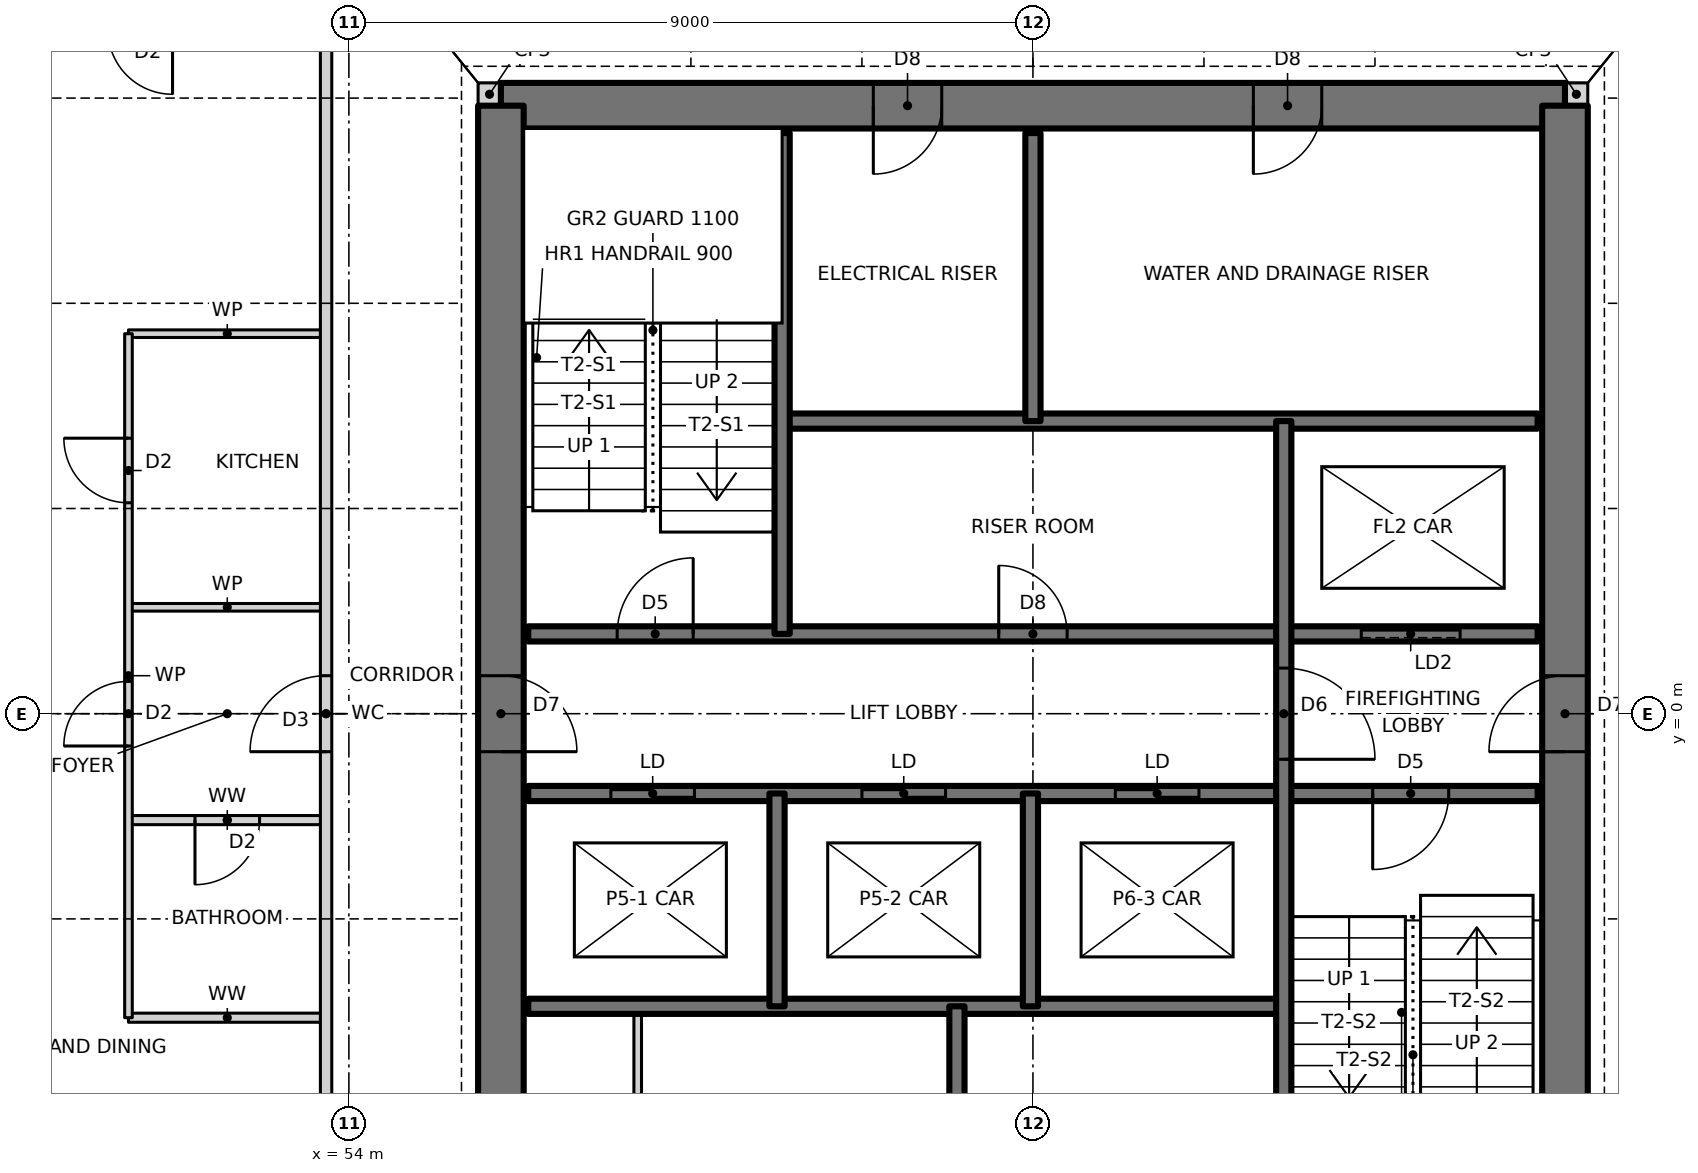
"""IFC4 building model, lengths in metres.
Left out: names, types, materials, properties, quantities, classifications, styles, units other than length and angle.
Written with IfcOpenShell. Run it as: python <this file> out.ifc"""

import sys

from ifc_helpers import new_model, si_unit, direction, frame, frame_2d, origin, place, context, subcontext, project, spatial, rectangle, extrude, element, fill, save


model = new_model("IFC4")
c1 = context("Model", 3, precision=1e-05, world=origin(), true_north=direction((0.0, 1.0)))
c2 = subcontext(c1, "Body", "Model", "MODEL_VIEW")
j1 = project(units=[si_unit("LENGTHUNIT", "METRE"), si_unit("PLANEANGLEUNIT", "RADIAN")], contexts=[c1])
p1 = place(None, origin())
s1 = spatial("IfcSite", under=j1, at=p1, CompositionType="ELEMENT")
p2 = place(p1, origin())
s2 = spatial("IfcBuilding", under=s1, at=p2, CompositionType="ELEMENT")
p3 = place(p2, frame((0.0, 0.0, 94.5)))
s3 = spatial("IfcBuildingStorey", under=s2, at=p3, CompositionType="ELEMENT", Elevation=94.5)
for number, where, z_axis, x_axis in (
    (1, (70.0, 8.15, 0.0), (0.0, 0.0, 1.0), (1.0, 0.0, 0.0)),
    (2, (55.7, 8.15, 0.0), (0.0, 0.0, 1.0), (1.0, 0.0, 0.0)),
):
    element("IfcWall", number, at=place(p3, frame(where, z_axis=z_axis, x_axis=x_axis)), inside=s3, PredefinedType="SOLIDWALL", context=c2, shape_type="SweptSolid", body=[
        extrude(rectangle(XDim=0.3, YDim=0.3, at=frame_2d((0.15, 0.0))), origin(), (0.0, 0.0, 1.0), 3.5),
    ])
p4 = place(p3, frame((70.0, 8.0, 0.0), z_axis=(0.0, 0.0, 1.0), x_axis=(-1.0, 0.0, 0.0)))
e3 = element("IfcWall", 3, at=p4, inside=s3, PredefinedType="SHEAR", context=c2, shape_type="SweptSolid", body=[
    extrude(rectangle(XDim=14.0, YDim=0.6, at=frame_2d((7.0, 0.0))), origin(), (0.0, 0.0, 1.0), 3.5),
])
p5 = place(p4, frame((8.2, 0.0, 0.0)))
e4 = element("IfcOpeningElement", 4, at=p5, cuts=e3, PredefinedType="OPENING", context=c2, shape_type="SweptSolid", body=[
    extrude(rectangle(XDim=0.9, YDim=2.1, at=frame_2d((0.45, 1.05))), frame((0.0, 0.31, 0.0), z_axis=(0.0, -1.0, 0.0), x_axis=(1.0, 0.0, 0.0)), (0.0, 0.0, 1.0), 0.62),
])
p6 = place(p4, frame((3.2, 0.0, 0.0)))
e5 = element("IfcOpeningElement", 5, at=p6, cuts=e3, PredefinedType="OPENING", context=c2, shape_type="SweptSolid", body=[
    extrude(rectangle(XDim=0.9, YDim=2.1, at=frame_2d((0.45, 1.05))), frame((0.0, 0.31, 0.0), z_axis=(0.0, -1.0, 0.0), x_axis=(1.0, 0.0, 0.0)), (0.0, 0.0, 1.0), 0.62),
])
p7 = place(p3, frame((70.0, -8.0, 0.0), z_axis=(0.0, 0.0, 1.0), x_axis=(0.0, 1.0, 0.0)))
e6 = element("IfcWall", 6, at=p7, inside=s3, PredefinedType="SHEAR", context=c2, shape_type="SweptSolid", body=[
    extrude(rectangle(XDim=16.0, YDim=0.6, at=frame_2d((8.0, 0.0))), origin(), (0.0, 0.0, 1.0), 3.5),
])
p8 = place(p7, frame((7.5, 0.0, 0.0)))
e7 = element("IfcOpeningElement", 7, at=p8, cuts=e6, PredefinedType="OPENING", context=c2, shape_type="SweptSolid", body=[
    extrude(rectangle(XDim=1.0, YDim=2.1, at=frame_2d((0.5, 1.05))), frame((0.0, 0.31, 0.0), z_axis=(0.0, -1.0, 0.0), x_axis=(1.0, 0.0, 0.0)), (0.0, 0.0, 1.0), 0.62),
])
p9 = place(p3, frame((56.0, 8.0, 0.0), z_axis=(0.0, 0.0, 1.0), x_axis=(0.0, -1.0, 0.0)))
e8 = element("IfcWall", 8, at=p9, inside=s3, PredefinedType="SHEAR", context=c2, shape_type="SweptSolid", body=[
    extrude(rectangle(XDim=16.0, YDim=0.6, at=frame_2d((8.0, 0.0))), origin(), (0.0, 0.0, 1.0), 3.5),
])
p10 = place(p9, frame((7.5, 0.0, 0.0)))
e9 = element("IfcOpeningElement", 9, at=p10, cuts=e8, PredefinedType="OPENING", context=c2, shape_type="SweptSolid", body=[
    extrude(rectangle(XDim=1.0, YDim=2.1, at=frame_2d((0.5, 1.05))), frame((0.0, 0.31, 0.0), z_axis=(0.0, -1.0, 0.0), x_axis=(1.0, 0.0, 0.0)), (0.0, 0.0, 1.0), 0.62),
])
p11 = place(p3, frame((51.1, -4.0, 0.0), z_axis=(0.0, 0.0, 1.0), x_axis=(1.0, 0.0, 0.0)))
e10 = element("IfcWall", 10, at=p11, inside=s3, PredefinedType="PARTITIONING", context=c2, shape_type="SweptSolid", body=[
    extrude(rectangle(XDim=2.6, YDim=0.12, at=frame_2d((1.3, 0.0))), origin(), (0.0, 0.0, 1.0), 3.27),
])
p12 = place(p3, frame((56.36, -3.85, 0.0), z_axis=(0.0, 0.0, 1.0), x_axis=(1.0, 0.0, 0.0)))
e11 = element("IfcWall", 11, at=p12, inside=s3, PredefinedType="SOLIDWALL", context=c2, shape_type="SweptSolid", body=[
    extrude(rectangle(XDim=9.94, YDim=0.2, at=frame_2d((4.97, 0.0))), origin(), (0.0, 0.0, 1.0), 3.5),
])
p13 = place(p3, frame((51.1, -1.4, 0.0), z_axis=(0.0, 0.0, 1.0), x_axis=(1.0, 0.0, 0.0)))
e12 = element("IfcWall", 12, at=p13, inside=s3, PredefinedType="PARTITIONING", context=c2, shape_type="SweptSolid", body=[
    extrude(rectangle(XDim=2.6, YDim=0.12, at=frame_2d((1.3, 0.0))), origin(), (0.0, 0.0, 1.0), 3.27),
])
p14 = place(p13, frame((0.875, 0.0, 0.0)))
e13 = element("IfcOpeningElement", 13, at=p14, cuts=e12, PredefinedType="OPENING", context=c2, shape_type="SweptSolid", body=[
    extrude(rectangle(XDim=0.85, YDim=2.1, at=frame_2d((0.425, 1.05))), frame((0.0, 0.07, 0.0), z_axis=(0.0, -1.0, 0.0), x_axis=(1.0, 0.0, 0.0)), (0.0, 0.0, 1.0), 0.14),
])
p15 = place(p3, frame((56.36, -1.05, 0.0), z_axis=(0.0, 0.0, 1.0), x_axis=(1.0, 0.0, 0.0)))
e14 = element("IfcWall", 14, at=p15, inside=s3, PredefinedType="SOLIDWALL", context=c2, shape_type="SweptSolid", body=[
    extrude(rectangle(XDim=13.28, YDim=0.2, at=frame_2d((6.64, 0.0))), origin(), (0.0, 0.0, 1.0), 3.5),
])
p16 = place(p15, frame((11.11, 0.0, 0.0)))
e15 = element("IfcOpeningElement", 15, at=p16, cuts=e14, PredefinedType="OPENING", context=c2, shape_type="SweptSolid", body=[
    extrude(rectangle(XDim=1.0, YDim=2.1, at=frame_2d((0.5, 1.05))), frame((0.0, 0.11, 0.0), z_axis=(0.0, -1.0, 0.0), x_axis=(1.0, 0.0, 0.0)), (0.0, 0.0, 1.0), 0.22),
])
p17 = place(p15, frame((1.087, 0.0, 0.0)))
e16 = element("IfcOpeningElement", 16, at=p17, cuts=e14, PredefinedType="OPENING", context=c2, shape_type="SweptSolid", body=[
    extrude(rectangle(XDim=1.1, YDim=2.1, at=frame_2d((0.55, 1.05))), frame((0.0, 0.11, 0.0), z_axis=(0.0, -1.0, 0.0), x_axis=(1.0, 0.0, 0.0)), (0.0, 0.0, 1.0), 0.22),
])
p18 = place(p15, frame((4.39, 0.0, 0.0)))
e17 = element("IfcOpeningElement", 17, at=p18, cuts=e14, PredefinedType="OPENING", context=c2, shape_type="SweptSolid", body=[
    extrude(rectangle(XDim=1.1, YDim=2.1, at=frame_2d((0.55, 1.05))), frame((0.0, 0.11, 0.0), z_axis=(0.0, -1.0, 0.0), x_axis=(1.0, 0.0, 0.0)), (0.0, 0.0, 1.0), 0.22),
])
p19 = place(p15, frame((7.724, 0.0, 0.0)))
e18 = element("IfcOpeningElement", 18, at=p19, cuts=e14, PredefinedType="OPENING", context=c2, shape_type="SweptSolid", body=[
    extrude(rectangle(XDim=1.1, YDim=2.1, at=frame_2d((0.55, 1.05))), frame((0.0, 0.11, 0.0), z_axis=(0.0, -1.0, 0.0), x_axis=(1.0, 0.0, 0.0)), (0.0, 0.0, 1.0), 0.22),
])
p20 = place(p3, frame((56.36, 1.05, 0.0), z_axis=(0.0, 0.0, 1.0), x_axis=(1.0, 0.0, 0.0)))
e19 = element("IfcWall", 19, at=p20, inside=s3, PredefinedType="SOLIDWALL", context=c2, shape_type="SweptSolid", body=[
    extrude(rectangle(XDim=13.28, YDim=0.2, at=frame_2d((6.64, 0.0))), origin(), (0.0, 0.0, 1.0), 3.5),
])
p21 = place(p20, frame((1.17, 0.0, 0.0)))
e20 = element("IfcOpeningElement", 20, at=p21, cuts=e19, PredefinedType="OPENING", context=c2, shape_type="SweptSolid", body=[
    extrude(rectangle(XDim=1.0, YDim=2.1, at=frame_2d((0.5, 1.05))), frame((0.0, 0.11, 0.0), z_axis=(0.0, -1.0, 0.0), x_axis=(1.0, 0.0, 0.0)), (0.0, 0.0, 1.0), 0.22),
])
p22 = place(p20, frame((6.19, 0.0, 0.0)))
e21 = element("IfcOpeningElement", 21, at=p22, cuts=e19, PredefinedType="OPENING", context=c2, shape_type="SweptSolid", body=[
    extrude(rectangle(XDim=0.9, YDim=2.1, at=frame_2d((0.45, 1.05))), frame((0.0, 0.11, 0.0), z_axis=(0.0, -1.0, 0.0), x_axis=(1.0, 0.0, 0.0)), (0.0, 0.0, 1.0), 0.22),
])
p23 = place(p20, frame((10.96, 0.0, 0.0)))
e22 = element("IfcOpeningElement", 22, at=p23, cuts=e19, PredefinedType="OPENING", context=c2, shape_type="SweptSolid", body=[
    extrude(rectangle(XDim=1.3, YDim=2.1, at=frame_2d((0.65, 1.05))), frame((0.0, 0.11, 0.0), z_axis=(0.0, -1.0, 0.0), x_axis=(1.0, 0.0, 0.0)), (0.0, 0.0, 1.0), 0.22),
])
p24 = place(p3, frame((51.1, 1.4, 0.0), z_axis=(0.0, 0.0, 1.0), x_axis=(1.0, 0.0, 0.0)))
e23 = element("IfcWall", 23, at=p24, inside=s3, PredefinedType="PARTITIONING", context=c2, shape_type="SweptSolid", body=[
    extrude(rectangle(XDim=2.6, YDim=0.1, at=frame_2d((1.3, 0.0))), origin(), (0.0, 0.0, 1.0), 3.27),
])
p25 = place(p3, frame((59.7, 3.85, 0.0), z_axis=(0.0, 0.0, 1.0), x_axis=(1.0, 0.0, 0.0)))
e24 = element("IfcWall", 24, at=p25, inside=s3, PredefinedType="SOLIDWALL", context=c2, shape_type="SweptSolid", body=[
    extrude(rectangle(XDim=9.94, YDim=0.2, at=frame_2d((4.97, 0.0))), origin(), (0.0, 0.0, 1.0), 3.5),
])
p26 = place(p3, frame((51.1, 5.0, 0.0), z_axis=(0.0, 0.0, 1.0), x_axis=(1.0, 0.0, 0.0)))
e25 = element("IfcWall", 25, at=p26, inside=s3, PredefinedType="PARTITIONING", context=c2, shape_type="SweptSolid", body=[
    extrude(rectangle(XDim=2.6, YDim=0.1, at=frame_2d((1.3, 0.0))), origin(), (0.0, 0.0, 1.0), 3.27),
])
p27 = place(p3, frame((66.3, -7.64, 0.0), z_axis=(0.0, 0.0, 1.0), x_axis=(0.0, 1.0, 0.0)))
e26 = element("IfcWall", 26, at=p27, inside=s3, PredefinedType="SOLIDWALL", context=c2, shape_type="SweptSolid", body=[
    extrude(rectangle(XDim=11.49, YDim=0.2, at=frame_2d((5.745, 0.0))), origin(), (0.0, 0.0, 1.0), 3.5),
])
p28 = place(p27, frame((7.04, 0.0, 0.0)))
e27 = element("IfcOpeningElement", 27, at=p28, cuts=e26, PredefinedType="OPENING", context=c2, shape_type="SweptSolid", body=[
    extrude(rectangle(XDim=1.2, YDim=2.1, at=frame_2d((0.6, 1.05))), frame((0.0, 0.11, 0.0), z_axis=(0.0, -1.0, 0.0), x_axis=(1.0, 0.0, 0.0)), (0.0, 0.0, 1.0), 0.22),
])
p29 = place(p3, frame((63.0, 3.85, 0.0), z_axis=(0.0, 0.0, 1.0), x_axis=(0.0, 1.0, 0.0)))
e28 = element("IfcWall", 28, at=p29, inside=s3, PredefinedType="SOLIDWALL", context=c2, shape_type="SweptSolid", body=[
    extrude(rectangle(XDim=3.79, YDim=0.2, at=frame_2d((1.895, 0.0))), origin(), (0.0, 0.0, 1.0), 3.5),
])
p30 = place(p3, frame((62.967, -3.85, 0.0), z_axis=(0.0, 0.0, 1.0), x_axis=(0.0, 1.0, 0.0)))
e29 = element("IfcWall", 29, at=p30, inside=s3, PredefinedType="SOLIDWALL", context=c2, shape_type="SweptSolid", body=[
    extrude(rectangle(XDim=2.8, YDim=0.2, at=frame_2d((1.4, 0.0))), origin(), (0.0, 0.0, 1.0), 3.5),
])
p31 = place(p3, frame((62.0, -7.64, 0.0), z_axis=(0.0, 0.0, 1.0), x_axis=(0.0, 1.0, 0.0)))
e30 = element("IfcWall", 30, at=p31, inside=s3, PredefinedType="SOLIDWALL", context=c2, shape_type="SweptSolid", body=[
    extrude(rectangle(XDim=3.79, YDim=0.2, at=frame_2d((1.895, 0.0))), origin(), (0.0, 0.0, 1.0), 3.5),
])
p32 = place(p3, frame((59.7, 1.05, 0.0), z_axis=(0.0, 0.0, 1.0), x_axis=(0.0, 1.0, 0.0)))
e31 = element("IfcWall", 31, at=p32, inside=s3, PredefinedType="SOLIDWALL", context=c2, shape_type="SweptSolid", body=[
    extrude(rectangle(XDim=6.59, YDim=0.2, at=frame_2d((3.295, 0.0))), origin(), (0.0, 0.0, 1.0), 3.5),
])
p33 = place(p3, frame((59.633, -3.85, 0.0), z_axis=(0.0, 0.0, 1.0), x_axis=(0.0, 1.0, 0.0)))
e32 = element("IfcWall", 32, at=p33, inside=s3, PredefinedType="SOLIDWALL", context=c2, shape_type="SweptSolid", body=[
    extrude(rectangle(XDim=2.8, YDim=0.2, at=frame_2d((1.4, 0.0))), origin(), (0.0, 0.0, 1.0), 3.5),
])
p34 = place(p3, frame((57.8, -7.64, 0.0), z_axis=(0.0, 0.0, 1.0), x_axis=(0.0, 1.0, 0.0)))
e33 = element("IfcWall", 33, at=p34, inside=s3, PredefinedType="PARTITIONING", context=c2, shape_type="SweptSolid", body=[
    extrude(rectangle(XDim=3.79, YDim=0.1, at=frame_2d((1.895, 0.0))), origin(), (0.0, 0.0, 1.0), 3.3),
])
p35 = place(p34, frame((1.445, 0.0, 0.0)))
e34 = element("IfcOpeningElement", 34, at=p35, cuts=e33, PredefinedType="OPENING", context=c2, shape_type="SweptSolid", body=[
    extrude(rectangle(XDim=0.9, YDim=2.1, at=frame_2d((0.45, 1.05))), frame((0.0, 0.06, 0.0), z_axis=(0.0, -1.0, 0.0), x_axis=(1.0, 0.0, 0.0)), (0.0, 0.0, 1.0), 0.12),
])
p36 = place(p3, frame((53.7, -10.768, 0.0), z_axis=(0.0, 0.0, 1.0), x_axis=(0.0, 1.0, 0.0)))
e35 = element("IfcWall", 35, at=p36, inside=s3, PredefinedType="PARTITIONING", context=c2, shape_type="SweptSolid", body=[
    extrude(rectangle(XDim=21.536, YDim=0.15, at=frame_2d((10.768, 0.0))), origin(), (0.0, 0.0, 1.0), 3.27),
])
p37 = place(p36, frame((10.268, 0.0, 0.0)))
e36 = element("IfcOpeningElement", 36, at=p37, cuts=e35, PredefinedType="OPENING", context=c2, shape_type="SweptSolid", body=[
    extrude(rectangle(XDim=1.0, YDim=2.1, at=frame_2d((0.5, 1.05))), frame((0.0, 0.085, 0.0), z_axis=(0.0, -1.0, 0.0), x_axis=(1.0, 0.0, 0.0)), (0.0, 0.0, 1.0), 0.17),
])
p38 = place(p3, frame((51.1, -4.0, 0.0), z_axis=(0.0, 0.0, 1.0), x_axis=(0.0, 1.0, 0.0)))
e37 = element("IfcWall", 37, at=p38, inside=s3, PredefinedType="PARTITIONING", context=c2, shape_type="SweptSolid", body=[
    extrude(rectangle(XDim=9.0, YDim=0.1, at=frame_2d((4.5, 0.0))), origin(), (0.0, 0.0, 1.0), 3.27),
])
p39 = place(p38, frame((6.775, 0.0, 0.0)))
e38 = element("IfcOpeningElement", 38, at=p39, cuts=e37, PredefinedType="OPENING", context=c2, shape_type="SweptSolid", body=[
    extrude(rectangle(XDim=0.85, YDim=2.1, at=frame_2d((0.425, 1.05))), frame((0.0, 0.06, 0.0), z_axis=(0.0, -1.0, 0.0), x_axis=(1.0, 0.0, 0.0)), (0.0, 0.0, 1.0), 0.12),
])
p40 = place(p38, frame((3.575, 0.0, 0.0)))
e39 = element("IfcOpeningElement", 39, at=p40, cuts=e37, PredefinedType="OPENING", context=c2, shape_type="SweptSolid", body=[
    extrude(rectangle(XDim=0.85, YDim=2.1, at=frame_2d((0.425, 1.05))), frame((0.0, 0.06, 0.0), z_axis=(0.0, -1.0, 0.0), x_axis=(1.0, 0.0, 0.0)), (0.0, 0.0, 1.0), 0.12),
])
p41 = place(p21, origin())
e40 = element("IfcDoor", 40, at=p41, inside=s3, OperationType="SINGLE_SWING_RIGHT", PredefinedType="DOOR", context=c2, shape_type="SweptSolid", body=[
    extrude(rectangle(XDim=1.0, YDim=2.1, at=frame_2d((0.5, 1.05))), frame((0.0, 0.025, 0.0), z_axis=(0.0, -1.0, 0.0), x_axis=(1.0, 0.0, 0.0)), (0.0, 0.0, 1.0), 0.05),
])
fill(e20, e40)
p42 = place(p16, frame((1.0, 0.0, 0.0), z_axis=(0.0, 0.0, 1.0), x_axis=(-1.0, 0.0, 0.0)))
e41 = element("IfcDoor", 41, at=p42, inside=s3, OperationType="SINGLE_SWING_RIGHT", PredefinedType="DOOR", context=c2, shape_type="SweptSolid", body=[
    extrude(rectangle(XDim=1.0, YDim=2.1, at=frame_2d((0.5, 1.05))), frame((0.0, 0.025, 0.0), z_axis=(0.0, -1.0, 0.0), x_axis=(1.0, 0.0, 0.0)), (0.0, 0.0, 1.0), 0.05),
])
fill(e15, e41)
p43 = place(p28, frame((1.2, 0.0, 0.0), z_axis=(0.0, 0.0, 1.0), x_axis=(-1.0, 0.0, 0.0)))
e42 = element("IfcDoor", 42, at=p43, inside=s3, OperationType="SINGLE_SWING_RIGHT", PredefinedType="DOOR", context=c2, shape_type="SweptSolid", body=[
    extrude(rectangle(XDim=1.2, YDim=2.1, at=frame_2d((0.6, 1.05))), frame((0.0, 0.025, 0.0), z_axis=(0.0, -1.0, 0.0), x_axis=(1.0, 0.0, 0.0)), (0.0, 0.0, 1.0), 0.05),
])
fill(e27, e42)
p44 = place(p22, origin())
e43 = element("IfcDoor", 43, at=p44, inside=s3, OperationType="SINGLE_SWING_LEFT", PredefinedType="DOOR", context=c2, shape_type="SweptSolid", body=[
    extrude(rectangle(XDim=0.9, YDim=2.1, at=frame_2d((0.45, 1.05))), frame((0.0, 0.025, 0.0), z_axis=(0.0, -1.0, 0.0), x_axis=(1.0, 0.0, 0.0)), (0.0, 0.0, 1.0), 0.05),
])
fill(e21, e43)
p45 = place(p39, origin())
e44 = element("IfcDoor", 44, at=p45, inside=s3, OperationType="SINGLE_SWING_RIGHT", PredefinedType="DOOR", context=c2, shape_type="SweptSolid", body=[
    extrude(rectangle(XDim=0.85, YDim=2.1, at=frame_2d((0.425, 1.05))), frame((0.0, 0.025, 0.0), z_axis=(0.0, -1.0, 0.0), x_axis=(1.0, 0.0, 0.0)), (0.0, 0.0, 1.0), 0.05),
])
fill(e38, e44)
p46 = place(p37, origin())
e45 = element("IfcDoor", 45, at=p46, inside=s3, OperationType="SINGLE_SWING_LEFT", PredefinedType="DOOR", context=c2, shape_type="SweptSolid", body=[
    extrude(rectangle(XDim=1.0, YDim=2.1, at=frame_2d((0.5, 1.05))), frame((0.0, 0.025, 0.0), z_axis=(0.0, -1.0, 0.0), x_axis=(1.0, 0.0, 0.0)), (0.0, 0.0, 1.0), 0.05),
])
fill(e36, e45)
p47 = place(p40, origin())
e46 = element("IfcDoor", 46, at=p47, inside=s3, OperationType="SINGLE_SWING_LEFT", PredefinedType="DOOR", context=c2, shape_type="SweptSolid", body=[
    extrude(rectangle(XDim=0.85, YDim=2.1, at=frame_2d((0.425, 1.05))), frame((0.0, 0.025, 0.0), z_axis=(0.0, -1.0, 0.0), x_axis=(1.0, 0.0, 0.0)), (0.0, 0.0, 1.0), 0.05),
])
fill(e39, e46)
p48 = place(p14, frame((0.85, 0.0, 0.0), z_axis=(0.0, 0.0, 1.0), x_axis=(-1.0, 0.0, 0.0)))
e47 = element("IfcDoor", 47, at=p48, inside=s3, OperationType="SINGLE_SWING_RIGHT", PredefinedType="DOOR", context=c2, shape_type="SweptSolid", body=[
    extrude(rectangle(XDim=0.85, YDim=2.1, at=frame_2d((0.425, 1.05))), frame((0.0, 0.025, 0.0), z_axis=(0.0, -1.0, 0.0), x_axis=(1.0, 0.0, 0.0)), (0.0, 0.0, 1.0), 0.05),
])
fill(e13, e47)
p49 = place(p10, origin())
e48 = element("IfcDoor", 48, at=p49, inside=s3, OperationType="SINGLE_SWING_RIGHT", PredefinedType="DOOR", context=c2, shape_type="SweptSolid", body=[
    extrude(rectangle(XDim=1.0, YDim=2.1, at=frame_2d((0.5, 1.05))), frame((0.0, 0.025, 0.0), z_axis=(0.0, -1.0, 0.0), x_axis=(1.0, 0.0, 0.0)), (0.0, 0.0, 1.0), 0.05),
])
fill(e9, e48)
p50 = place(p8, origin())
e49 = element("IfcDoor", 49, at=p50, inside=s3, OperationType="SINGLE_SWING_LEFT", PredefinedType="DOOR", context=c2, shape_type="SweptSolid", body=[
    extrude(rectangle(XDim=1.0, YDim=2.1, at=frame_2d((0.5, 1.05))), frame((0.0, 0.025, 0.0), z_axis=(0.0, -1.0, 0.0), x_axis=(1.0, 0.0, 0.0)), (0.0, 0.0, 1.0), 0.05),
])
fill(e7, e49)
p51 = place(p5, origin())
e50 = element("IfcDoor", 50, at=p51, inside=s3, OperationType="SINGLE_SWING_RIGHT", PredefinedType="DOOR", context=c2, shape_type="SweptSolid", body=[
    extrude(rectangle(XDim=0.9, YDim=2.1, at=frame_2d((0.45, 1.05))), frame((0.0, 0.025, 0.0), z_axis=(0.0, -1.0, 0.0), x_axis=(1.0, 0.0, 0.0)), (0.0, 0.0, 1.0), 0.05),
])
fill(e4, e50)
p52 = place(p6, origin())
e51 = element("IfcDoor", 51, at=p52, inside=s3, OperationType="SINGLE_SWING_RIGHT", PredefinedType="DOOR", context=c2, shape_type="SweptSolid", body=[
    extrude(rectangle(XDim=0.9, YDim=2.1, at=frame_2d((0.45, 1.05))), frame((0.0, 0.025, 0.0), z_axis=(0.0, -1.0, 0.0), x_axis=(1.0, 0.0, 0.0)), (0.0, 0.0, 1.0), 0.05),
])
fill(e5, e51)
p53 = place(p17, origin())
e52 = element("IfcDoor", 52, at=p53, inside=s3, OperationType="DOUBLE_DOOR_SLIDING", PredefinedType="DOOR", context=c2, shape_type="SweptSolid", body=[
    extrude(rectangle(XDim=1.1, YDim=2.1, at=frame_2d((0.55, 1.05))), frame((0.0, 0.025, 0.0), z_axis=(0.0, -1.0, 0.0), x_axis=(1.0, 0.0, 0.0)), (0.0, 0.0, 1.0), 0.05),
])
fill(e16, e52)
p54 = place(p18, origin())
e53 = element("IfcDoor", 53, at=p54, inside=s3, OperationType="DOUBLE_DOOR_SLIDING", PredefinedType="DOOR", context=c2, shape_type="SweptSolid", body=[
    extrude(rectangle(XDim=1.1, YDim=2.1, at=frame_2d((0.55, 1.05))), frame((0.0, 0.025, 0.0), z_axis=(0.0, -1.0, 0.0), x_axis=(1.0, 0.0, 0.0)), (0.0, 0.0, 1.0), 0.05),
])
fill(e17, e53)
p55 = place(p19, origin())
e54 = element("IfcDoor", 54, at=p55, inside=s3, OperationType="DOUBLE_DOOR_SLIDING", PredefinedType="DOOR", context=c2, shape_type="SweptSolid", body=[
    extrude(rectangle(XDim=1.1, YDim=2.1, at=frame_2d((0.55, 1.05))), frame((0.0, 0.025, 0.0), z_axis=(0.0, -1.0, 0.0), x_axis=(1.0, 0.0, 0.0)), (0.0, 0.0, 1.0), 0.05),
])
fill(e18, e54)
p56 = place(p23, origin())
e55 = element("IfcDoor", 55, at=p56, inside=s3, OperationType="SLIDING_TO_LEFT", PredefinedType="DOOR", context=c2, shape_type="SweptSolid", body=[
    extrude(rectangle(XDim=1.3, YDim=2.1, at=frame_2d((0.65, 1.05))), frame((0.0, 0.025, 0.0), z_axis=(0.0, -1.0, 0.0), x_axis=(1.0, 0.0, 0.0)), (0.0, 0.0, 1.0), 0.05),
])
fill(e22, e55)
save(model, sys.argv[1])
